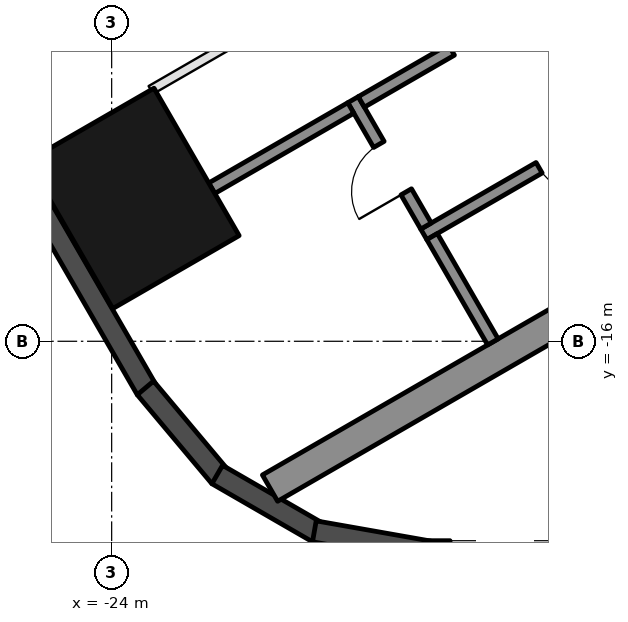
"""IFC4 building model, lengths in metres.
Left out: names, types, materials, properties, quantities, classifications, styles, units other than length and angle.
Written with IfcOpenShell. Run it as: python <this file> out.ifc"""

import sys

from ifc_helpers import new_model, si_unit, direction, frame, frame_2d, origin, origin_2d, place, context, subcontext, project, spatial, rectangle, hollow_rectangle, extrude, element, fill, save


model = new_model("IFC4")
c1 = context("Model", 3, precision=1e-05, world=origin(), true_north=direction((0.0, 1.0)))
c2 = subcontext(c1, "Body", "Model", "MODEL_VIEW")
j1 = project(units=[si_unit("LENGTHUNIT", "METRE"), si_unit("PLANEANGLEUNIT", "RADIAN")], contexts=[c1])
p1 = place(None, origin())
s1 = spatial("IfcSite", under=j1, at=p1, CompositionType="ELEMENT")
p2 = place(p1, origin())
s2 = spatial("IfcBuilding", under=s1, at=p2, CompositionType="ELEMENT")
p3 = place(p2, frame((0.0, 0.0, 105.7)))
s3 = spatial("IfcBuildingStorey", under=s2, at=p3, CompositionType="ELEMENT", Elevation=105.7)
p4 = place(p3, frame((-23.643, -13.65, 0.0), z_axis=(0.0, 0.0, 1.0), x_axis=(-0.5, 0.866025403784, 0.0)))
e1 = element("IfcColumn", 1, at=p4, inside=s3, PredefinedType="COLUMN", context=c2, shape_type="SweptSolid", body=[
    extrude(hollow_rectangle(XDim=2.8, YDim=2.4, WallThickness=0.07, at=origin_2d()), origin(), (0.0, 0.0, 1.0), 3.7),
])
p5 = place(p3, frame((-26.257, -11.893, 0.0), z_axis=(0.0, 0.0, 1.0), x_axis=(0.500018773155, -0.866014564827, 0.0)))
e2 = element("IfcWall", 2, at=p5, inside=s3, PredefinedType="SOLIDWALL", context=c2, shape_type="SweptSolid", body=[
    extrude(rectangle(XDim=5.658, YDim=0.35, at=frame_2d((2.829, 0.0))), origin(), (0.0, 0.0, 1.0), 3.55),
])
for number, where, z_axis, x_axis in (
    (3, (-23.445, -16.768, 0.0), (0.0, 0.0, 1.0), (0.643, -0.766, 0.0)),
    (4, (-22.264, -18.192, 0.0), (0.0, 0.0, 1.0), (0.866, -0.5, 0.0)),
):
    element("IfcWall", number, at=place(p3, frame(where, z_axis=z_axis, x_axis=x_axis)), inside=s3, PredefinedType="SOLIDWALL", context=c2, shape_type="SweptSolid", body=[
        extrude(rectangle(XDim=1.91, YDim=0.35, at=frame_2d((0.955, 0.0))), origin(), (0.0, 0.0, 1.0), 3.55),
    ])
p6 = place(p3, frame((-20.667, -19.126, 0.0), z_axis=(0.0, 0.0, 1.0), x_axis=(0.984798995425, -0.173697837091, 0.0)))
e5 = element("IfcWall", 5, at=p6, inside=s3, PredefinedType="SOLIDWALL", context=c2, shape_type="SweptSolid", body=[
    extrude(rectangle(XDim=1.91, YDim=0.35, at=frame_2d((0.955, 0.0))), origin(), (0.0, 0.0, 1.0), 3.55),
])
p7 = place(p3, frame((-18.816, -19.455, 0.0), z_axis=(0.0, 0.0, 1.0), x_axis=(1.0, 0.0, 0.0)))
e6 = element("IfcWall", 6, at=p7, inside=s3, PredefinedType="SOLIDWALL", context=c2, shape_type="SweptSolid", body=[
    extrude(rectangle(XDim=11.816, YDim=0.35, at=frame_2d((5.908, 0.0))), origin(), (0.0, 0.0, 1.0), 3.55),
])
p8 = place(p7, frame((0.381, 0.0, 0.3)))
e7 = element("IfcOpeningElement", 7, at=p8, cuts=e6, PredefinedType="OPENING", context=c2, shape_type="SweptSolid", body=[
    extrude(rectangle(XDim=1.8, YDim=2.65, at=frame_2d((0.9, 1.325))), frame((0.0, 0.185, 0.0), z_axis=(0.0, -1.0, 0.0), x_axis=(1.0, 0.0, 0.0)), (0.0, 0.0, 1.0), 0.37),
])
p9 = place(p7, frame((7.716, 0.0, 0.0)))
e8 = element("IfcOpeningElement", 8, at=p9, cuts=e6, PredefinedType="OPENING", context=c2, shape_type="SweptSolid", body=[
    extrude(rectangle(XDim=2.4, YDim=2.4, at=frame_2d((1.2, 1.2))), frame((0.0, 0.185, 0.0), z_axis=(0.0, -1.0, 0.0), x_axis=(1.0, 0.0, 0.0)), (0.0, 0.0, 1.0), 0.37),
])
p10 = place(p7, frame((3.816, 0.0, 0.3)))
e9 = element("IfcOpeningElement", 9, at=p10, cuts=e6, PredefinedType="OPENING", context=c2, shape_type="SweptSolid", body=[
    extrude(rectangle(XDim=1.6, YDim=2.65, at=frame_2d((0.8, 1.325))), frame((0.0, 0.185, 0.0), z_axis=(0.0, -1.0, 0.0), x_axis=(1.0, 0.0, 0.0)), (0.0, 0.0, 1.0), 0.37),
])
p11 = place(p7, frame((5.716, 0.0, 0.3)))
e10 = element("IfcOpeningElement", 10, at=p11, cuts=e6, PredefinedType="OPENING", context=c2, shape_type="SweptSolid", body=[
    extrude(rectangle(XDim=1.6, YDim=2.65, at=frame_2d((0.8, 1.325))), frame((0.0, 0.185, 0.0), z_axis=(0.0, -1.0, 0.0), x_axis=(1.0, 0.0, 0.0)), (0.0, 0.0, 1.0), 0.37),
])
p12 = place(p3, frame((-8.547, -10.997, 0.0), z_axis=(0.0, 0.0, 1.0), x_axis=(-0.866025009528, -0.500000682871, 0.0)))
e11 = element("IfcWall", 11, at=p12, inside=s3, PredefinedType="SHEAR", context=c2, shape_type="SweptSolid", body=[
    extrude(rectangle(XDim=14.837, YDim=0.5, at=frame_2d((7.418, 0.0))), origin(), (0.0, 0.0, 1.0), 3.5),
])
p13 = place(p3, frame((-10.068, -9.162, 0.0), z_axis=(0.0, 0.0, 1.0), x_axis=(-0.866032725843, -0.499987317609, 0.0)))
e12 = element("IfcWall", 12, at=p13, inside=s3, PredefinedType="SHEAR", context=c2, shape_type="SweptSolid", body=[
    extrude(rectangle(XDim=10.16, YDim=0.2, at=frame_2d((5.08, 0.0))), origin(), (0.0, 0.0, 1.0), 3.5),
])
p14 = place(p13, frame((1.99, 0.0, 0.0)))
e13 = element("IfcOpeningElement", 13, at=p14, cuts=e12, PredefinedType="OPENING", context=c2, shape_type="SweptSolid", body=[
    extrude(rectangle(XDim=0.9, YDim=2.1, at=frame_2d((0.45, 1.05))), frame((0.0, 0.11, 0.0), z_axis=(0.0, -1.0, 0.0), x_axis=(1.0, 0.0, 0.0)), (0.0, 0.0, 1.0), 0.22),
])
p15 = place(p13, frame((7.07, 0.0, 0.0)))
e14 = element("IfcOpeningElement", 14, at=p15, cuts=e12, PredefinedType="OPENING", context=c2, shape_type="SweptSolid", body=[
    extrude(rectangle(XDim=0.9, YDim=2.1, at=frame_2d((0.45, 1.05))), frame((0.0, 0.11, 0.0), z_axis=(0.0, -1.0, 0.0), x_axis=(1.0, 0.0, 0.0)), (0.0, 0.0, 1.0), 0.22),
])
p16 = place(p3, frame((-20.031, -12.026, 0.0), z_axis=(0.0, 0.0, 1.0), x_axis=(0.500033551112, -0.866006032174, 0.0)))
e15 = element("IfcWall", 15, at=p16, inside=s3, PredefinedType="SHEAR", context=c2, shape_type="SweptSolid", body=[
    extrude(rectangle(XDim=2.4, YDim=0.2, at=frame_2d((1.2, 0.0))), origin(), (0.0, 0.0, 1.0), 3.5),
])
p17 = place(p16, frame((0.85, 0.0, 0.0)))
e16 = element("IfcOpeningElement", 16, at=p17, cuts=e15, PredefinedType="OPENING", context=c2, shape_type="SweptSolid", body=[
    extrude(rectangle(XDim=0.9, YDim=2.1, at=frame_2d((0.45, 1.05))), frame((0.0, 0.11, 0.0), z_axis=(0.0, -1.0, 0.0), x_axis=(1.0, 0.0, 0.0)), (0.0, 0.0, 1.0), 0.22),
])
p18 = place(p3, frame((-18.413, -11.208, 0.0), z_axis=(0.0, 0.0, 1.0), x_axis=(-0.866038183914, -0.499977863513, 0.0)))
e17 = element("IfcWall", 17, at=p18, inside=s3, PredefinedType="SHEAR", context=c2, shape_type="SweptSolid", body=[
    extrude(rectangle(XDim=1.71, YDim=0.2, at=frame_2d((0.855, 0.0))), origin(), (0.0, 0.0, 1.0), 3.5),
])
p19 = place(p3, frame((-18.73, -14.278, 0.0), z_axis=(0.0, 0.0, 1.0), x_axis=(0.50002537861, -0.866010750942, 0.0)))
e18 = element("IfcWall", 18, at=p19, inside=s3, PredefinedType="SHEAR", context=c2, shape_type="SweptSolid", body=[
    extrude(rectangle(XDim=2.0, YDim=0.2, at=frame_2d((1.0, 0.0))), origin(), (0.0, 0.0, 1.0), 3.5),
])
p20 = place(p3, frame((-20.067, -12.163, 0.0), z_axis=(0.0, 0.0, 1.0), x_axis=(-0.866060851709, -0.499938597367, 0.0)))
e19 = element("IfcWall", 19, at=p20, inside=s3, PredefinedType="SHEAR", context=c2, shape_type="SweptSolid", body=[
    extrude(rectangle(XDim=2.64, YDim=0.2, at=frame_2d((1.32, 0.0))), origin(), (0.0, 0.0, 1.0), 3.5),
])
p21 = place(p3, frame((-19.363, -9.562, 0.0), z_axis=(0.0, 0.0, 1.0), x_axis=(-0.86601185002, -0.500023475074, 0.0)))
e20 = element("IfcWall", 20, at=p21, inside=s3, PredefinedType="PARTITIONING", context=c2, shape_type="SweptSolid", body=[
    extrude(rectangle(XDim=4.61, YDim=0.15, at=frame_2d((2.305, 0.0))), origin(), (0.0, 0.0, 1.0), 3.5),
])
p22 = place(p15, origin())
e21 = element("IfcDoor", 21, at=p22, inside=s3, OperationType="SINGLE_SWING_LEFT", PredefinedType="DOOR", context=c2, shape_type="SweptSolid", body=[
    extrude(rectangle(XDim=0.9, YDim=2.1, at=frame_2d((0.45, 1.05))), frame((0.0, 0.025, 0.0), z_axis=(0.0, -1.0, 0.0), x_axis=(1.0, 0.0, 0.0)), (0.0, 0.0, 1.0), 0.05),
])
fill(e14, e21)
p23 = place(p17, frame((0.9, 0.0, 0.0), z_axis=(0.0, 0.0, 1.0), x_axis=(-1.0, 0.0, 0.0)))
e22 = element("IfcDoor", 22, at=p23, inside=s3, OperationType="SINGLE_SWING_LEFT", PredefinedType="DOOR", context=c2, shape_type="SweptSolid", body=[
    extrude(rectangle(XDim=0.9, YDim=2.1, at=frame_2d((0.45, 1.05))), frame((0.0, 0.025, 0.0), z_axis=(0.0, -1.0, 0.0), x_axis=(1.0, 0.0, 0.0)), (0.0, 0.0, 1.0), 0.05),
])
fill(e16, e22)
save(model, sys.argv[1])
